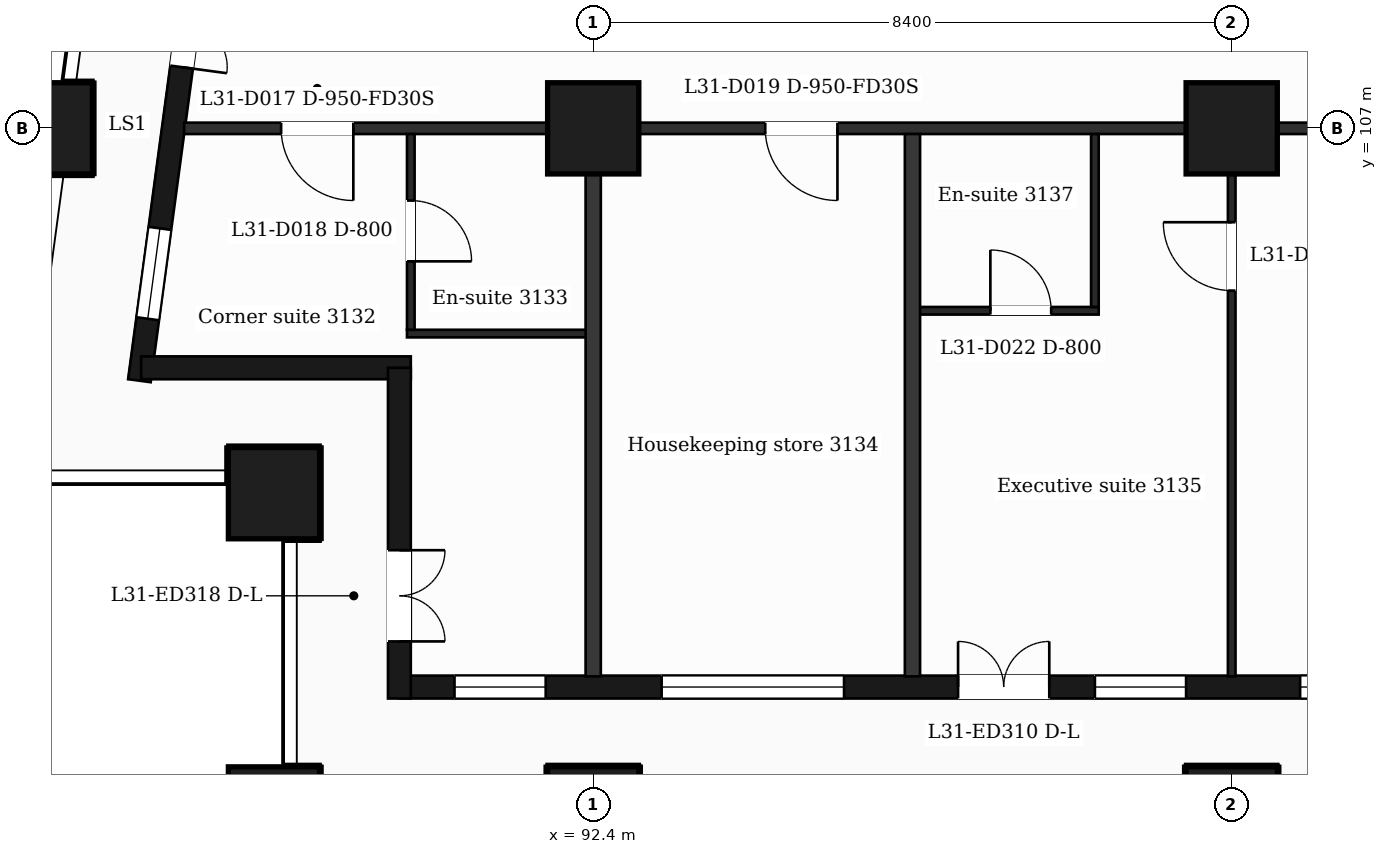
"""IFC4 building model, lengths in metres.
Left out: names, types, materials, properties, quantities, classifications, styles, units other than length and angle.
Written with IfcOpenShell. Run it as: python <this file> out.ifc"""

import sys

from ifc_helpers import new_model, si_unit, direction, frame, frame_2d, origin, origin_2d, place, context, subcontext, project, spatial, rectangle, extrude, element, fill, save


model = new_model("IFC4")
c1 = context("Model", 3, precision=1e-05, world=origin(), true_north=direction((0.0, 1.0)))
c2 = subcontext(c1, "Body", "Model", "MODEL_VIEW")
j1 = project(units=[si_unit("LENGTHUNIT", "METRE"), si_unit("PLANEANGLEUNIT", "RADIAN")], contexts=[c1])
p1 = place(None, origin())
s1 = spatial("IfcSite", under=j1, at=p1, CompositionType="ELEMENT")
p2 = place(p1, origin())
s2 = spatial("IfcBuilding", under=s1, at=p2, CompositionType="ELEMENT")
p3 = place(p2, frame((0.0, 0.0, 131.7)))
s3 = spatial("IfcBuildingStorey", under=s2, at=p3, CompositionType="ELEMENT", Elevation=131.7)
for number, where, z_axis, x_axis in (
    (1, (92.4, 98.0, 0.0), (0.0, 0.0, 1.0), (1.0, 0.0, 0.0)),
    (2, (100.8, 98.0, 0.0), (0.0, 0.0, 1.0), (1.0, 0.0, 0.0)),
    (3, (88.2, 98.0, 0.0), (0.0, 0.0, 1.0), (1.0, 0.0, 0.0)),
    (4, (88.2, 102.2, 0.0), (0.0, 0.0, 1.0), (1.0, 0.0, 0.0)),
    (5, (92.4, 107.0, 0.0), (0.0, 0.0, 1.0), (1.0, 0.0, 0.0)),
    (6, (100.8, 107.0, 0.0), (0.0, 0.0, 1.0), (1.0, 0.0, 0.0)),
    (7, (85.211, 107.0, 0.0), (0.0, 0.0, 1.0), (1.0, 0.0, 0.0)),
):
    element("IfcColumn", number, at=place(p3, frame(where, z_axis=z_axis, x_axis=x_axis)), inside=s3, PredefinedType="COLUMN", context=c2, shape_type="SweptSolid", body=[
        extrude(rectangle(XDim=1.2, YDim=1.2, at=origin_2d()), origin(), (0.0, 0.0, 1.0), 3.7),
    ])
p4 = place(p3, frame((89.85, 99.65, 0.0), z_axis=(0.0, 0.0, 1.0), x_axis=(1.0, 0.0, 0.0)))
e8 = element("IfcWall", 8, at=p4, inside=s3, PredefinedType="SOLIDWALL", context=c2, shape_type="SweptSolid", body=[
    extrude(rectangle(XDim=47.25, YDim=0.3, at=frame_2d((23.625, 0.0))), origin(), (0.0, 0.0, 1.0), 3.2),
])
p5 = place(p4, frame((0.725, 0.0, 0.9)))
e9 = element("IfcOpeningElement", 9, at=p5, cuts=e8, PredefinedType="OPENING", context=c2, shape_type="SweptSolid", body=[
    extrude(rectangle(XDim=1.2, YDim=2.1, at=frame_2d((0.6, 1.05))), frame((0.0, 0.16, 0.0), z_axis=(0.0, -1.0, 0.0), x_axis=(1.0, 0.0, 0.0)), (0.0, 0.0, 1.0), 0.32),
])
p6 = place(p4, frame((3.45, 0.0, 0.9)))
e10 = element("IfcOpeningElement", 10, at=p6, cuts=e8, PredefinedType="OPENING", context=c2, shape_type="SweptSolid", body=[
    extrude(rectangle(XDim=2.4, YDim=2.1, at=frame_2d((1.2, 1.05))), frame((0.0, 0.16, 0.0), z_axis=(0.0, -1.0, 0.0), x_axis=(1.0, 0.0, 0.0)), (0.0, 0.0, 1.0), 0.32),
])
p7 = place(p4, frame((7.35, 0.0, 0.0)))
e11 = element("IfcOpeningElement", 11, at=p7, cuts=e8, PredefinedType="OPENING", context=c2, shape_type="SweptSolid", body=[
    extrude(rectangle(XDim=1.2, YDim=2.4, at=frame_2d((0.6, 1.2))), frame((0.0, 0.16, 0.0), z_axis=(0.0, -1.0, 0.0), x_axis=(1.0, 0.0, 0.0)), (0.0, 0.0, 1.0), 0.32),
])
p8 = place(p4, frame((9.15, 0.0, 0.9)))
e12 = element("IfcOpeningElement", 12, at=p8, cuts=e8, PredefinedType="OPENING", context=c2, shape_type="SweptSolid", body=[
    extrude(rectangle(XDim=1.2, YDim=2.1, at=frame_2d((0.6, 1.05))), frame((0.0, 0.16, 0.0), z_axis=(0.0, -1.0, 0.0), x_axis=(1.0, 0.0, 0.0)), (0.0, 0.0, 1.0), 0.32),
])
p9 = place(p4, frame((11.85, 0.0, 0.9)))
e13 = element("IfcOpeningElement", 13, at=p9, cuts=e8, PredefinedType="OPENING", context=c2, shape_type="SweptSolid", body=[
    extrude(rectangle(XDim=2.4, YDim=2.1, at=frame_2d((1.2, 1.05))), frame((0.0, 0.16, 0.0), z_axis=(0.0, -1.0, 0.0), x_axis=(1.0, 0.0, 0.0)), (0.0, 0.0, 1.0), 0.32),
])
p10 = place(p4, frame((16.05, 0.0, 0.9)))
e14 = element("IfcOpeningElement", 14, at=p10, cuts=e8, PredefinedType="OPENING", context=c2, shape_type="SweptSolid", body=[
    extrude(rectangle(XDim=2.4, YDim=2.1, at=frame_2d((1.2, 1.05))), frame((0.0, 0.16, 0.0), z_axis=(0.0, -1.0, 0.0), x_axis=(1.0, 0.0, 0.0)), (0.0, 0.0, 1.0), 0.32),
])
p11 = place(p4, frame((20.85, 0.0, 0.9)))
e15 = element("IfcOpeningElement", 15, at=p11, cuts=e8, PredefinedType="OPENING", context=c2, shape_type="SweptSolid", body=[
    extrude(rectangle(XDim=1.2, YDim=2.1, at=frame_2d((0.6, 1.05))), frame((0.0, 0.16, 0.0), z_axis=(0.0, -1.0, 0.0), x_axis=(1.0, 0.0, 0.0)), (0.0, 0.0, 1.0), 0.32),
])
p12 = place(p4, frame((25.05, 0.0, 0.9)))
e16 = element("IfcOpeningElement", 16, at=p12, cuts=e8, PredefinedType="OPENING", context=c2, shape_type="SweptSolid", body=[
    extrude(rectangle(XDim=1.2, YDim=2.1, at=frame_2d((0.6, 1.05))), frame((0.0, 0.16, 0.0), z_axis=(0.0, -1.0, 0.0), x_axis=(1.0, 0.0, 0.0)), (0.0, 0.0, 1.0), 0.32),
])
p13 = place(p4, frame((28.65, 0.0, 0.9)))
e17 = element("IfcOpeningElement", 17, at=p13, cuts=e8, PredefinedType="OPENING", context=c2, shape_type="SweptSolid", body=[
    extrude(rectangle(XDim=2.4, YDim=2.1, at=frame_2d((1.2, 1.05))), frame((0.0, 0.16, 0.0), z_axis=(0.0, -1.0, 0.0), x_axis=(1.0, 0.0, 0.0)), (0.0, 0.0, 1.0), 0.32),
])
p14 = place(p4, frame((32.85, 0.0, 0.9)))
e18 = element("IfcOpeningElement", 18, at=p14, cuts=e8, PredefinedType="OPENING", context=c2, shape_type="SweptSolid", body=[
    extrude(rectangle(XDim=2.4, YDim=2.1, at=frame_2d((1.2, 1.05))), frame((0.0, 0.16, 0.0), z_axis=(0.0, -1.0, 0.0), x_axis=(1.0, 0.0, 0.0)), (0.0, 0.0, 1.0), 0.32),
])
p15 = place(p4, frame((37.05, 0.0, 0.9)))
e19 = element("IfcOpeningElement", 19, at=p15, cuts=e8, PredefinedType="OPENING", context=c2, shape_type="SweptSolid", body=[
    extrude(rectangle(XDim=2.4, YDim=2.1, at=frame_2d((1.2, 1.05))), frame((0.0, 0.16, 0.0), z_axis=(0.0, -1.0, 0.0), x_axis=(1.0, 0.0, 0.0)), (0.0, 0.0, 1.0), 0.32),
])
p16 = place(p4, frame((41.25, 0.0, 0.9)))
e20 = element("IfcOpeningElement", 20, at=p16, cuts=e8, PredefinedType="OPENING", context=c2, shape_type="SweptSolid", body=[
    extrude(rectangle(XDim=2.4, YDim=2.1, at=frame_2d((1.2, 1.05))), frame((0.0, 0.16, 0.0), z_axis=(0.0, -1.0, 0.0), x_axis=(1.0, 0.0, 0.0)), (0.0, 0.0, 1.0), 0.32),
])
p17 = place(p4, frame((45.25, 0.0, 0.9)))
e21 = element("IfcOpeningElement", 21, at=p17, cuts=e8, PredefinedType="OPENING", context=c2, shape_type="SweptSolid", body=[
    extrude(rectangle(XDim=1.2, YDim=2.1, at=frame_2d((0.6, 1.05))), frame((0.0, 0.16, 0.0), z_axis=(0.0, -1.0, 0.0), x_axis=(1.0, 0.0, 0.0)), (0.0, 0.0, 1.0), 0.32),
])
p18 = place(p3, frame((87.334, 110.4, 0.0), z_axis=(0.0, 0.0, 1.0), x_axis=(-0.133437175554, -0.991057273915, 0.0)))
e22 = element("IfcWall", 22, at=p18, inside=s3, PredefinedType="SOLIDWALL", context=c2, shape_type="SweptSolid", body=[
    extrude(rectangle(XDim=6.781, YDim=0.3, at=frame_2d((3.39, 0.0))), origin(), (0.0, 0.0, 1.0), 3.2),
])
p19 = place(p18, frame((1.418, 0.0, 0.0)))
e23 = element("IfcOpeningElement", 23, at=p19, cuts=e22, PredefinedType="OPENING", context=c2, shape_type="SweptSolid", body=[
    extrude(rectangle(XDim=1.2, YDim=2.4, at=frame_2d((0.6, 1.2))), frame((0.0, 0.16, 0.0), z_axis=(0.0, -1.0, 0.0), x_axis=(1.0, 0.0, 0.0)), (0.0, 0.0, 1.0), 0.32),
])
p20 = place(p18, frame((4.758, 0.0, 0.9)))
e24 = element("IfcOpeningElement", 24, at=p20, cuts=e22, PredefinedType="OPENING", context=c2, shape_type="SweptSolid", body=[
    extrude(rectangle(XDim=1.2, YDim=2.1, at=frame_2d((0.6, 1.05))), frame((0.0, 0.16, 0.0), z_axis=(0.0, -1.0, 0.0), x_axis=(1.0, 0.0, 0.0)), (0.0, 0.0, 1.0), 0.32),
])
p21 = place(p3, frame((86.452, 103.85, 0.0), z_axis=(0.0, 0.0, 1.0), x_axis=(1.0, 0.0, 0.0)))
e25 = element("IfcWall", 25, at=p21, inside=s3, PredefinedType="SOLIDWALL", context=c2, shape_type="SweptSolid", body=[
    extrude(rectangle(XDim=3.548, YDim=0.3, at=frame_2d((1.774, 0.0))), origin(), (0.0, 0.0, 1.0), 3.2),
])
p22 = place(p3, frame((89.85, 103.85, 0.0), z_axis=(0.0, 0.0, 1.0), x_axis=(0.0, -1.0, 0.0)))
e26 = element("IfcWall", 26, at=p22, inside=s3, PredefinedType="SOLIDWALL", context=c2, shape_type="SweptSolid", body=[
    extrude(rectangle(XDim=4.35, YDim=0.3, at=frame_2d((2.175, 0.0))), origin(), (0.0, 0.0, 1.0), 3.2),
])
p23 = place(p22, frame((2.4, 0.0, 0.0)))
e27 = element("IfcOpeningElement", 27, at=p23, cuts=e26, PredefinedType="OPENING", context=c2, shape_type="SweptSolid", body=[
    extrude(rectangle(XDim=1.2, YDim=2.4, at=frame_2d((0.6, 1.2))), frame((0.0, 0.16, 0.0), z_axis=(0.0, -1.0, 0.0), x_axis=(1.0, 0.0, 0.0)), (0.0, 0.0, 1.0), 0.32),
])
p24 = place(p3, frame((89.95, 104.3, 0.0), z_axis=(0.0, 0.0, 1.0), x_axis=(1.0, 0.0, 0.0)))
e28 = element("IfcWall", 28, at=p24, inside=s3, PredefinedType="PARTITIONING", context=c2, shape_type="SweptSolid", body=[
    extrude(rectangle(XDim=2.45, YDim=0.1, at=frame_2d((1.225, 0.0))), origin(), (0.0, 0.0, 1.0), 3.2),
])
p25 = place(p3, frame((96.6, 104.6, 0.0), z_axis=(0.0, 0.0, 1.0), x_axis=(1.0, 0.0, 0.0)))
e29 = element("IfcWall", 29, at=p25, inside=s3, PredefinedType="PARTITIONING", context=c2, shape_type="SweptSolid", body=[
    extrude(rectangle(XDim=2.45, YDim=0.1, at=frame_2d((1.225, 0.0))), origin(), (0.0, 0.0, 1.0), 3.2),
])
p26 = place(p25, frame((1.025, 0.0, 0.0)))
e30 = element("IfcOpeningElement", 30, at=p26, cuts=e29, PredefinedType="OPENING", context=c2, shape_type="SweptSolid", body=[
    extrude(rectangle(XDim=0.8, YDim=2.1, at=frame_2d((0.4, 1.05))), frame((0.0, 0.06, 0.0), z_axis=(0.0, -1.0, 0.0), x_axis=(1.0, 0.0, 0.0)), (0.0, 0.0, 1.0), 0.12),
])
p27 = place(p3, frame((87.018, 107.0, 0.0), z_axis=(0.0, 0.0, 1.0), x_axis=(1.0, 0.0, 0.0)))
e31 = element("IfcWall", 31, at=p27, inside=s3, PredefinedType="PARTITIONING", context=c2, shape_type="SweptSolid", body=[
    extrude(rectangle(XDim=52.765, YDim=0.15, at=frame_2d((26.382, 0.0))), origin(), (0.0, 0.0, 1.0), 3.2),
])
p28 = place(p27, frame((1.276, 0.0, 0.0)))
e32 = element("IfcOpeningElement", 32, at=p28, cuts=e31, PredefinedType="OPENING", context=c2, shape_type="SweptSolid", body=[
    extrude(rectangle(XDim=0.95, YDim=2.1, at=frame_2d((0.475, 1.05))), frame((0.0, 0.085, 0.0), z_axis=(0.0, -1.0, 0.0), x_axis=(1.0, 0.0, 0.0)), (0.0, 0.0, 1.0), 0.17),
])
p29 = place(p27, frame((7.645, 0.0, 0.0)))
e33 = element("IfcOpeningElement", 33, at=p29, cuts=e31, PredefinedType="OPENING", context=c2, shape_type="SweptSolid", body=[
    extrude(rectangle(XDim=0.95, YDim=2.1, at=frame_2d((0.475, 1.05))), frame((0.0, 0.085, 0.0), z_axis=(0.0, -1.0, 0.0), x_axis=(1.0, 0.0, 0.0)), (0.0, 0.0, 1.0), 0.17),
])
p30 = place(p27, frame((16.812, 0.0, 0.0)))
e34 = element("IfcOpeningElement", 34, at=p30, cuts=e31, PredefinedType="OPENING", context=c2, shape_type="SweptSolid", body=[
    extrude(rectangle(XDim=1.0, YDim=2.1, at=frame_2d((0.5, 1.05))), frame((0.0, 0.085, 0.0), z_axis=(0.0, -1.0, 0.0), x_axis=(1.0, 0.0, 0.0)), (0.0, 0.0, 1.0), 0.17),
])
p31 = place(p27, frame((22.952, 0.0, 0.0)))
e35 = element("IfcOpeningElement", 35, at=p31, cuts=e31, PredefinedType="OPENING", context=c2, shape_type="SweptSolid", body=[
    extrude(rectangle(XDim=0.95, YDim=2.1, at=frame_2d((0.475, 1.05))), frame((0.0, 0.085, 0.0), z_axis=(0.0, -1.0, 0.0), x_axis=(1.0, 0.0, 0.0)), (0.0, 0.0, 1.0), 0.17),
])
p32 = place(p27, frame((31.742, 0.0, 0.0)))
e36 = element("IfcOpeningElement", 36, at=p32, cuts=e31, PredefinedType="OPENING", context=c2, shape_type="SweptSolid", body=[
    extrude(rectangle(XDim=0.95, YDim=2.1, at=frame_2d((0.475, 1.05))), frame((0.0, 0.085, 0.0), z_axis=(0.0, -1.0, 0.0), x_axis=(1.0, 0.0, 0.0)), (0.0, 0.0, 1.0), 0.17),
])
p33 = place(p27, frame((35.169, 0.0, 0.0)))
e37 = element("IfcOpeningElement", 37, at=p33, cuts=e31, PredefinedType="OPENING", context=c2, shape_type="SweptSolid", body=[
    extrude(rectangle(XDim=0.95, YDim=2.1, at=frame_2d((0.475, 1.05))), frame((0.0, 0.085, 0.0), z_axis=(0.0, -1.0, 0.0), x_axis=(1.0, 0.0, 0.0)), (0.0, 0.0, 1.0), 0.17),
])
p34 = place(p27, frame((41.807, 0.0, 0.0)))
e38 = element("IfcOpeningElement", 38, at=p34, cuts=e31, PredefinedType="OPENING", context=c2, shape_type="SweptSolid", body=[
    extrude(rectangle(XDim=0.95, YDim=2.1, at=frame_2d((0.475, 1.05))), frame((0.0, 0.085, 0.0), z_axis=(0.0, -1.0, 0.0), x_axis=(1.0, 0.0, 0.0)), (0.0, 0.0, 1.0), 0.17),
])
p35 = place(p27, frame((43.832, 0.0, 0.0)))
e39 = element("IfcOpeningElement", 39, at=p35, cuts=e31, PredefinedType="OPENING", context=c2, shape_type="SweptSolid", body=[
    extrude(rectangle(XDim=0.95, YDim=2.1, at=frame_2d((0.475, 1.05))), frame((0.0, 0.085, 0.0), z_axis=(0.0, -1.0, 0.0), x_axis=(1.0, 0.0, 0.0)), (0.0, 0.0, 1.0), 0.17),
])
p36 = place(p27, frame((48.974, 0.0, 0.0)))
e40 = element("IfcOpeningElement", 40, at=p36, cuts=e31, PredefinedType="OPENING", context=c2, shape_type="SweptSolid", body=[
    extrude(rectangle(XDim=0.95, YDim=2.1, at=frame_2d((0.475, 1.05))), frame((0.0, 0.085, 0.0), z_axis=(0.0, -1.0, 0.0), x_axis=(1.0, 0.0, 0.0)), (0.0, 0.0, 1.0), 0.17),
])
p37 = place(p3, frame((90.0, 104.35, 0.0), z_axis=(0.0, 0.0, 1.0), x_axis=(0.0, 1.0, 0.0)))
e41 = element("IfcWall", 41, at=p37, inside=s3, PredefinedType="PARTITIONING", context=c2, shape_type="SweptSolid", body=[
    extrude(rectangle(XDim=2.575, YDim=0.1, at=frame_2d((1.288, 0.0))), origin(), (0.0, 0.0, 1.0), 3.2),
])
p38 = place(p37, frame((0.9, 0.0, 0.0)))
e42 = element("IfcOpeningElement", 42, at=p38, cuts=e41, PredefinedType="OPENING", context=c2, shape_type="SweptSolid", body=[
    extrude(rectangle(XDim=0.8, YDim=2.1, at=frame_2d((0.4, 1.05))), frame((0.0, 0.06, 0.0), z_axis=(0.0, -1.0, 0.0), x_axis=(1.0, 0.0, 0.0)), (0.0, 0.0, 1.0), 0.12),
])
for number, where, z_axis, x_axis in (
    (43, (92.4, 99.79, 0.0), (0.0, 0.0, 1.0), (0.0, 1.0, 0.0)),
    (44, (96.6, 99.79, 0.0), (0.0, 0.0, 1.0), (0.0, 1.0, 0.0)),
):
    element("IfcWall", number, at=place(p3, frame(where, z_axis=z_axis, x_axis=x_axis)), inside=s3, PredefinedType="PARTITIONING", context=c2, shape_type="SweptSolid", body=[
        extrude(rectangle(XDim=7.135, YDim=0.2, at=frame_2d((3.567, 0.0))), origin(), (0.0, 0.0, 1.0), 3.2),
    ])
p39 = place(p3, frame((99.0, 104.65, 0.0), z_axis=(0.0, 0.0, 1.0), x_axis=(0.0, 1.0, 0.0)))
e45 = element("IfcWall", 45, at=p39, inside=s3, PredefinedType="PARTITIONING", context=c2, shape_type="SweptSolid", body=[
    extrude(rectangle(XDim=2.275, YDim=0.1, at=frame_2d((1.138, 0.0))), origin(), (0.0, 0.0, 1.0), 3.2),
])
p40 = place(p3, frame((100.8, 99.79, 0.0), z_axis=(0.0, 0.0, 1.0), x_axis=(0.0, 1.0, 0.0)))
e46 = element("IfcWall", 46, at=p40, inside=s3, PredefinedType="PARTITIONING", context=c2, shape_type="SweptSolid", body=[
    extrude(rectangle(XDim=7.135, YDim=0.1, at=frame_2d((3.567, 0.0))), origin(), (0.0, 0.0, 1.0), 3.2),
])
p41 = place(p40, frame((5.075, 0.0, 0.0)))
e47 = element("IfcOpeningElement", 47, at=p41, cuts=e46, PredefinedType="OPENING", context=c2, shape_type="SweptSolid", body=[
    extrude(rectangle(XDim=0.9, YDim=2.1, at=frame_2d((0.45, 1.05))), frame((0.0, 0.06, 0.0), z_axis=(0.0, -1.0, 0.0), x_axis=(1.0, 0.0, 0.0)), (0.0, 0.0, 1.0), 0.12),
])
p42 = place(p5, origin())
e48 = element("IfcWindow", 48, at=p42, inside=s3, PartitioningType="SINGLE_PANEL", PredefinedType="WINDOW", context=c2, shape_type="SweptSolid", body=[
    extrude(rectangle(XDim=1.2, YDim=2.1, at=frame_2d((0.6, 1.05))), frame((0.0, 0.03, 0.0), z_axis=(0.0, -1.0, 0.0), x_axis=(1.0, 0.0, 0.0)), (0.0, 0.0, 1.0), 0.06),
])
fill(e9, e48)
p43 = place(p6, origin())
e49 = element("IfcWindow", 49, at=p43, inside=s3, PartitioningType="SINGLE_PANEL", PredefinedType="WINDOW", context=c2, shape_type="SweptSolid", body=[
    extrude(rectangle(XDim=2.4, YDim=2.1, at=frame_2d((1.2, 1.05))), frame((0.0, 0.03, 0.0), z_axis=(0.0, -1.0, 0.0), x_axis=(1.0, 0.0, 0.0)), (0.0, 0.0, 1.0), 0.06),
])
fill(e10, e49)
p44 = place(p7, origin())
e50 = element("IfcDoor", 50, at=p44, inside=s3, OperationType="DOUBLE_DOOR_SINGLE_SWING", PredefinedType="DOOR", context=c2, shape_type="SweptSolid", body=[
    extrude(rectangle(XDim=1.2, YDim=2.4, at=frame_2d((0.6, 1.2))), frame((0.0, 0.025, 0.0), z_axis=(0.0, -1.0, 0.0), x_axis=(1.0, 0.0, 0.0)), (0.0, 0.0, 1.0), 0.05),
])
fill(e11, e50)
p45 = place(p8, origin())
e51 = element("IfcWindow", 51, at=p45, inside=s3, PartitioningType="SINGLE_PANEL", PredefinedType="WINDOW", context=c2, shape_type="SweptSolid", body=[
    extrude(rectangle(XDim=1.2, YDim=2.1, at=frame_2d((0.6, 1.05))), frame((0.0, 0.03, 0.0), z_axis=(0.0, -1.0, 0.0), x_axis=(1.0, 0.0, 0.0)), (0.0, 0.0, 1.0), 0.06),
])
fill(e12, e51)
p46 = place(p9, origin())
e52 = element("IfcWindow", 52, at=p46, inside=s3, PartitioningType="SINGLE_PANEL", PredefinedType="WINDOW", context=c2, shape_type="SweptSolid", body=[
    extrude(rectangle(XDim=2.4, YDim=2.1, at=frame_2d((1.2, 1.05))), frame((0.0, 0.03, 0.0), z_axis=(0.0, -1.0, 0.0), x_axis=(1.0, 0.0, 0.0)), (0.0, 0.0, 1.0), 0.06),
])
fill(e13, e52)
p47 = place(p19, origin())
e53 = element("IfcDoor", 53, at=p47, inside=s3, OperationType="DOUBLE_DOOR_SINGLE_SWING", PredefinedType="DOOR", context=c2, shape_type="SweptSolid", body=[
    extrude(rectangle(XDim=1.2, YDim=2.4, at=frame_2d((0.6, 1.2))), frame((0.0, 0.025, 0.0), z_axis=(0.0, -1.0, 0.0), x_axis=(1.0, 0.0, 0.0)), (0.0, 0.0, 1.0), 0.05),
])
fill(e23, e53)
p48 = place(p20, origin())
e54 = element("IfcWindow", 54, at=p48, inside=s3, PartitioningType="SINGLE_PANEL", PredefinedType="WINDOW", context=c2, shape_type="SweptSolid", body=[
    extrude(rectangle(XDim=1.2, YDim=2.1, at=frame_2d((0.6, 1.05))), frame((0.0, 0.03, 0.0), z_axis=(0.0, -1.0, 0.0), x_axis=(1.0, 0.0, 0.0)), (0.0, 0.0, 1.0), 0.06),
])
fill(e24, e54)
p49 = place(p23, origin())
e55 = element("IfcDoor", 55, at=p49, inside=s3, OperationType="DOUBLE_DOOR_SINGLE_SWING", PredefinedType="DOOR", context=c2, shape_type="SweptSolid", body=[
    extrude(rectangle(XDim=1.2, YDim=2.4, at=frame_2d((0.6, 1.2))), frame((0.0, 0.025, 0.0), z_axis=(0.0, -1.0, 0.0), x_axis=(1.0, 0.0, 0.0)), (0.0, 0.0, 1.0), 0.05),
])
fill(e27, e55)
p50 = place(p28, origin())
e56 = element("IfcDoor", 56, at=p50, inside=s3, OperationType="SINGLE_SWING_RIGHT", PredefinedType="DOOR", context=c2, shape_type="SweptSolid", body=[
    extrude(rectangle(XDim=0.95, YDim=2.1, at=frame_2d((0.475, 1.05))), frame((0.0, 0.025, 0.0), z_axis=(0.0, -1.0, 0.0), x_axis=(1.0, 0.0, 0.0)), (0.0, 0.0, 1.0), 0.05),
])
fill(e32, e56)
p51 = place(p38, origin())
e57 = element("IfcDoor", 57, at=p51, inside=s3, OperationType="SINGLE_SWING_LEFT", PredefinedType="DOOR", context=c2, shape_type="SweptSolid", body=[
    extrude(rectangle(XDim=0.8, YDim=2.1, at=frame_2d((0.4, 1.05))), frame((0.0, 0.025, 0.0), z_axis=(0.0, -1.0, 0.0), x_axis=(1.0, 0.0, 0.0)), (0.0, 0.0, 1.0), 0.05),
])
fill(e42, e57)
p52 = place(p29, origin())
e58 = element("IfcDoor", 58, at=p52, inside=s3, OperationType="SINGLE_SWING_RIGHT", PredefinedType="DOOR", context=c2, shape_type="SweptSolid", body=[
    extrude(rectangle(XDim=0.95, YDim=2.1, at=frame_2d((0.475, 1.05))), frame((0.0, 0.025, 0.0), z_axis=(0.0, -1.0, 0.0), x_axis=(1.0, 0.0, 0.0)), (0.0, 0.0, 1.0), 0.05),
])
fill(e33, e58)
p53 = place(p41, origin())
e59 = element("IfcDoor", 59, at=p53, inside=s3, OperationType="SINGLE_SWING_RIGHT", PredefinedType="DOOR", context=c2, shape_type="SweptSolid", body=[
    extrude(rectangle(XDim=0.9, YDim=2.1, at=frame_2d((0.45, 1.05))), frame((0.0, 0.025, 0.0), z_axis=(0.0, -1.0, 0.0), x_axis=(1.0, 0.0, 0.0)), (0.0, 0.0, 1.0), 0.05),
])
fill(e47, e59)
p54 = place(p26, origin())
e60 = element("IfcDoor", 60, at=p54, inside=s3, OperationType="SINGLE_SWING_LEFT", PredefinedType="DOOR", context=c2, shape_type="SweptSolid", body=[
    extrude(rectangle(XDim=0.8, YDim=2.1, at=frame_2d((0.4, 1.05))), frame((0.0, 0.025, 0.0), z_axis=(0.0, -1.0, 0.0), x_axis=(1.0, 0.0, 0.0)), (0.0, 0.0, 1.0), 0.05),
])
fill(e30, e60)
save(model, sys.argv[1])
